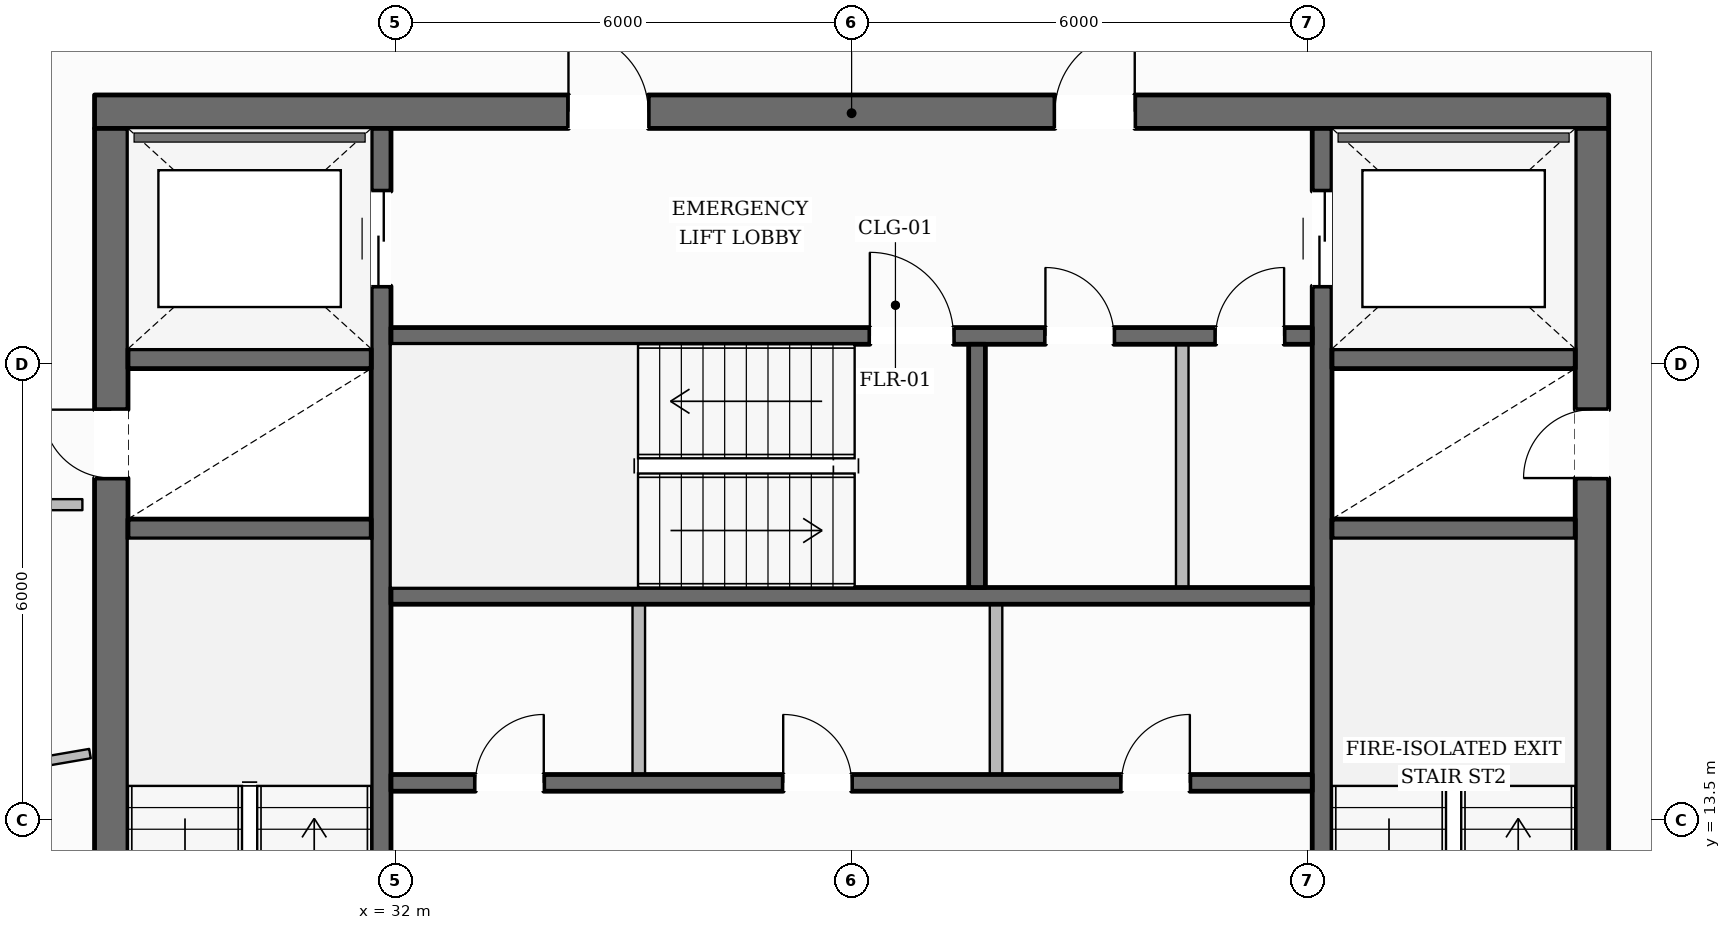
"""IFC4 building model, lengths in metres.
Left out: names, types, materials, properties, quantities, classifications, styles, units other than length and angle.
Written with IfcOpenShell. Run it as: python <this file> out.ifc"""

import sys

from ifc_helpers import new_model, si_unit, direction, frame, frame_2d, origin, place, context, subcontext, project, spatial, rectangle, extrude, element, fill, save


model = new_model("IFC4")
c1 = context("Model", 3, precision=1e-05, world=origin(), true_north=direction((0.0, 1.0)))
c2 = subcontext(c1, "Body", "Model", "MODEL_VIEW")
j1 = project(units=[si_unit("LENGTHUNIT", "METRE"), si_unit("PLANEANGLEUNIT", "RADIAN")], contexts=[c1])
p1 = place(None, origin())
s1 = spatial("IfcSite", under=j1, at=p1, CompositionType="ELEMENT")
p2 = place(p1, origin())
s2 = spatial("IfcBuilding", under=s1, at=p2, CompositionType="ELEMENT")
p3 = place(p2, frame((0.0, 0.0, 184.25)))
s3 = spatial("IfcBuildingStorey", under=s2, at=p3, CompositionType="ELEMENT", Elevation=184.25)
p4 = place(p3, frame((28.04, 22.82, 0.0), z_axis=(0.0, 0.0, 1.0), x_axis=(1.0, 0.0, 0.0)))
e1 = element("IfcWall", 1, at=p4, inside=s3, PredefinedType="SOLIDWALL", context=c2, shape_type="SweptSolid", body=[
    extrude(rectangle(XDim=19.92, YDim=0.44, at=frame_2d((9.96, 0.0))), origin(), (0.0, 0.0, 1.0), 3.6),
])
p5 = place(p4, frame((6.235, 0.0, 0.0)))
e2 = element("IfcOpeningElement", 2, at=p5, cuts=e1, PredefinedType="OPENING", context=c2, shape_type="SweptSolid", body=[
    extrude(rectangle(XDim=1.05, YDim=2.15, at=frame_2d((0.525, 1.075))), frame((0.0, 0.23, 0.0), z_axis=(0.0, -1.0, 0.0), x_axis=(1.0, 0.0, 0.0)), (0.0, 0.0, 1.0), 0.46),
])
p6 = place(p4, frame((12.635, 0.0, 0.0)))
e3 = element("IfcOpeningElement", 3, at=p6, cuts=e1, PredefinedType="OPENING", context=c2, shape_type="SweptSolid", body=[
    extrude(rectangle(XDim=1.05, YDim=2.15, at=frame_2d((0.525, 1.075))), frame((0.0, 0.23, 0.0), z_axis=(0.0, -1.0, 0.0), x_axis=(1.0, 0.0, 0.0)), (0.0, 0.0, 1.0), 0.46),
])
p7 = place(p3, frame((28.26, 9.6, 0.0), z_axis=(0.0, 0.0, 1.0), x_axis=(0.0, 1.0, 0.0)))
e4 = element("IfcWall", 4, at=p7, inside=s3, PredefinedType="SOLIDWALL", context=c2, shape_type="SweptSolid", body=[
    extrude(rectangle(XDim=13.0, YDim=0.44, at=frame_2d((6.5, 0.0))), origin(), (0.0, 0.0, 1.0), 3.6),
])
p8 = place(p7, frame((0.2, 0.0, 0.0)))
e5 = element("IfcOpeningElement", 5, at=p8, cuts=e4, PredefinedType="OPENING", context=c2, shape_type="SweptSolid", body=[
    extrude(rectangle(XDim=1.1, YDim=2.15, at=frame_2d((0.55, 1.075))), frame((0.0, 0.23, 0.0), z_axis=(0.0, -1.0, 0.0), x_axis=(1.0, 0.0, 0.0)), (0.0, 0.0, 1.0), 0.46),
])
p9 = place(p7, frame((8.4, 0.0, 0.0)))
e6 = element("IfcOpeningElement", 6, at=p9, cuts=e4, PredefinedType="OPENING", context=c2, shape_type="SweptSolid", body=[
    extrude(rectangle(XDim=0.9, YDim=2.1, at=frame_2d((0.45, 1.05))), frame((0.0, 0.23, 0.0), z_axis=(0.0, -1.0, 0.0), x_axis=(1.0, 0.0, 0.0)), (0.0, 0.0, 1.0), 0.46),
])
p10 = place(p3, frame((47.74, 9.6, 0.0), z_axis=(0.0, 0.0, 1.0), x_axis=(0.0, 1.0, 0.0)))
e7 = element("IfcWall", 7, at=p10, inside=s3, PredefinedType="SOLIDWALL", context=c2, shape_type="SweptSolid", body=[
    extrude(rectangle(XDim=13.0, YDim=0.44, at=frame_2d((6.5, 0.0))), origin(), (0.0, 0.0, 1.0), 3.6),
])
p11 = place(p10, frame((0.2, 0.0, 0.0)))
e8 = element("IfcOpeningElement", 8, at=p11, cuts=e7, PredefinedType="OPENING", context=c2, shape_type="SweptSolid", body=[
    extrude(rectangle(XDim=1.1, YDim=2.15, at=frame_2d((0.55, 1.075))), frame((0.0, 0.23, 0.0), z_axis=(0.0, -1.0, 0.0), x_axis=(1.0, 0.0, 0.0)), (0.0, 0.0, 1.0), 0.46),
])
p12 = place(p10, frame((8.4, 0.0, 0.0)))
e9 = element("IfcOpeningElement", 9, at=p12, cuts=e7, PredefinedType="OPENING", context=c2, shape_type="SweptSolid", body=[
    extrude(rectangle(XDim=0.9, YDim=2.1, at=frame_2d((0.45, 1.05))), frame((0.0, 0.23, 0.0), z_axis=(0.0, -1.0, 0.0), x_axis=(1.0, 0.0, 0.0)), (0.0, 0.0, 1.0), 0.46),
])
p13 = place(p3, frame((31.81, 9.6, 0.0), z_axis=(0.0, 0.0, 1.0), x_axis=(0.0, 1.0, 0.0)))
e10 = element("IfcWall", 10, at=p13, inside=s3, PredefinedType="SHEAR", context=c2, shape_type="SweptSolid", body=[
    extrude(rectangle(XDim=13.0, YDim=0.26, at=frame_2d((6.5, 0.0))), origin(), (0.0, 0.0, 1.0), 3.6),
])
p14 = place(p13, frame((10.925, 0.0, 0.0)))
e11 = element("IfcOpeningElement", 11, at=p14, cuts=e10, PredefinedType="OPENING", context=c2, shape_type="SweptSolid", body=[
    extrude(rectangle(XDim=1.25, YDim=2.25, at=frame_2d((0.625, 1.125))), frame((0.0, 0.14, 0.0), z_axis=(0.0, -1.0, 0.0), x_axis=(1.0, 0.0, 0.0)), (0.0, 0.0, 1.0), 0.28),
])
p15 = place(p3, frame((44.19, 9.6, 0.0), z_axis=(0.0, 0.0, 1.0), x_axis=(0.0, 1.0, 0.0)))
e12 = element("IfcWall", 12, at=p15, inside=s3, PredefinedType="SHEAR", context=c2, shape_type="SweptSolid", body=[
    extrude(rectangle(XDim=13.0, YDim=0.26, at=frame_2d((6.5, 0.0))), origin(), (0.0, 0.0, 1.0), 3.6),
])
p16 = place(p15, frame((10.925, 0.0, 0.0)))
e13 = element("IfcOpeningElement", 13, at=p16, cuts=e12, PredefinedType="OPENING", context=c2, shape_type="SweptSolid", body=[
    extrude(rectangle(XDim=1.25, YDim=2.25, at=frame_2d((0.625, 1.125))), frame((0.0, 0.14, 0.0), z_axis=(0.0, -1.0, 0.0), x_axis=(1.0, 0.0, 0.0)), (0.0, 0.0, 1.0), 0.28),
])
for number, where, z_axis, x_axis in (
    (14, (28.48, 17.33, 0.0), (0.0, 0.0, 1.0), (1.0, 0.0, 0.0)),
    (15, (28.48, 19.57, 0.0), (0.0, 0.0, 1.0), (1.0, 0.0, 0.0)),
    (16, (44.32, 17.33, 0.0), (0.0, 0.0, 1.0), (1.0, 0.0, 0.0)),
    (17, (44.32, 19.57, 0.0), (0.0, 0.0, 1.0), (1.0, 0.0, 0.0)),
):
    element("IfcWall", number, at=place(p3, frame(where, z_axis=z_axis, x_axis=x_axis)), inside=s3, PredefinedType="SHEAR", context=c2, shape_type="SweptSolid", body=[
        extrude(rectangle(XDim=3.2, YDim=0.26, at=frame_2d((1.6, 0.0))), origin(), (0.0, 0.0, 1.0), 3.6),
    ])
p17 = place(p3, frame((31.94, 19.87, 0.0), z_axis=(0.0, 0.0, 1.0), x_axis=(1.0, 0.0, 0.0)))
e18 = element("IfcWall", 18, at=p17, inside=s3, PredefinedType="SOLIDWALL", context=c2, shape_type="SweptSolid", body=[
    extrude(rectangle(XDim=12.12, YDim=0.22, at=frame_2d((6.06, 0.0))), origin(), (0.0, 0.0, 1.0), 3.6),
])
p18 = place(p17, frame((6.3, 0.0, 0.0)))
e19 = element("IfcOpeningElement", 19, at=p18, cuts=e18, PredefinedType="OPENING", context=c2, shape_type="SweptSolid", body=[
    extrude(rectangle(XDim=1.1, YDim=2.15, at=frame_2d((0.55, 1.075))), frame((0.0, 0.12, 0.0), z_axis=(0.0, -1.0, 0.0), x_axis=(1.0, 0.0, 0.0)), (0.0, 0.0, 1.0), 0.24),
])
p19 = place(p17, frame((8.61, 0.0, 0.0)))
e20 = element("IfcOpeningElement", 20, at=p19, cuts=e18, PredefinedType="OPENING", context=c2, shape_type="SweptSolid", body=[
    extrude(rectangle(XDim=0.9, YDim=2.1, at=frame_2d((0.45, 1.05))), frame((0.0, 0.12, 0.0), z_axis=(0.0, -1.0, 0.0), x_axis=(1.0, 0.0, 0.0)), (0.0, 0.0, 1.0), 0.24),
])
p20 = place(p17, frame((10.85, 0.0, 0.0)))
e21 = element("IfcOpeningElement", 21, at=p20, cuts=e18, PredefinedType="OPENING", context=c2, shape_type="SweptSolid", body=[
    extrude(rectangle(XDim=0.9, YDim=2.1, at=frame_2d((0.45, 1.05))), frame((0.0, 0.12, 0.0), z_axis=(0.0, -1.0, 0.0), x_axis=(1.0, 0.0, 0.0)), (0.0, 0.0, 1.0), 0.24),
])
p21 = place(p3, frame((31.94, 16.45, 0.0), z_axis=(0.0, 0.0, 1.0), x_axis=(1.0, 0.0, 0.0)))
e22 = element("IfcWall", 22, at=p21, inside=s3, PredefinedType="SOLIDWALL", context=c2, shape_type="SweptSolid", body=[
    extrude(rectangle(XDim=12.12, YDim=0.22, at=frame_2d((6.06, 0.0))), origin(), (0.0, 0.0, 1.0), 3.6),
])
p22 = place(p3, frame((39.65, 16.56, 0.0), z_axis=(0.0, 0.0, 1.0), x_axis=(0.0, 1.0, 0.0)))
e23 = element("IfcWall", 23, at=p22, inside=s3, PredefinedType="SOLIDWALL", context=c2, shape_type="SweptSolid", body=[
    extrude(rectangle(XDim=3.2, YDim=0.22, at=frame_2d((1.6, 0.0))), origin(), (0.0, 0.0, 1.0), 3.6),
])
p23 = place(p3, frame((31.94, 13.99, 0.0), z_axis=(0.0, 0.0, 1.0), x_axis=(1.0, 0.0, 0.0)))
e24 = element("IfcWall", 24, at=p23, inside=s3, PredefinedType="SOLIDWALL", context=c2, shape_type="SweptSolid", body=[
    extrude(rectangle(XDim=12.12, YDim=0.22, at=frame_2d((6.06, 0.0))), origin(), (0.0, 0.0, 1.0), 3.6),
])
p24 = place(p23, frame((1.11, 0.0, 0.0)))
e25 = element("IfcOpeningElement", 25, at=p24, cuts=e24, PredefinedType="OPENING", context=c2, shape_type="SweptSolid", body=[
    extrude(rectangle(XDim=0.9, YDim=2.1, at=frame_2d((0.45, 1.05))), frame((0.0, 0.12, 0.0), z_axis=(0.0, -1.0, 0.0), x_axis=(1.0, 0.0, 0.0)), (0.0, 0.0, 1.0), 0.24),
])
p25 = place(p23, frame((5.16, 0.0, 0.0)))
e26 = element("IfcOpeningElement", 26, at=p25, cuts=e24, PredefinedType="OPENING", context=c2, shape_type="SweptSolid", body=[
    extrude(rectangle(XDim=0.9, YDim=2.1, at=frame_2d((0.45, 1.05))), frame((0.0, 0.12, 0.0), z_axis=(0.0, -1.0, 0.0), x_axis=(1.0, 0.0, 0.0)), (0.0, 0.0, 1.0), 0.24),
])
p26 = place(p23, frame((9.61, 0.0, 0.0)))
e27 = element("IfcOpeningElement", 27, at=p26, cuts=e24, PredefinedType="OPENING", context=c2, shape_type="SweptSolid", body=[
    extrude(rectangle(XDim=0.9, YDim=2.1, at=frame_2d((0.45, 1.05))), frame((0.0, 0.12, 0.0), z_axis=(0.0, -1.0, 0.0), x_axis=(1.0, 0.0, 0.0)), (0.0, 0.0, 1.0), 0.24),
])
p27 = place(p3, frame((15.064, 11.953, 0.0), z_axis=(0.0, 0.0, 1.0), x_axis=(0.495993114815, 0.86832645362, 0.0)))
e28 = element("IfcWall", 28, at=p27, inside=s3, PredefinedType="STANDARD", context=c2, shape_type="SweptSolid", body=[
    extrude(rectangle(XDim=37.324, YDim=0.35, at=frame_2d((18.662, 0.0))), origin(), (0.0, 0.0, 1.0), 3.132),
])
p28 = place(p27, frame((33.087, 0.0, 0.65)))
e29 = element("IfcOpeningElement", 29, at=p28, cuts=e28, PredefinedType="OPENING", context=c2, shape_type="SweptSolid", body=[
    extrude(rectangle(XDim=1.45, YDim=1.75, at=frame_2d((0.725, 0.875))), frame((0.0, 0.185, 0.0), z_axis=(0.0, -1.0, 0.0), x_axis=(1.0, 0.0, 0.0)), (0.0, 0.0, 1.0), 0.37),
])
p29 = place(p27, frame((27.026, 0.0, 0.65)))
e30 = element("IfcOpeningElement", 30, at=p29, cuts=e28, PredefinedType="OPENING", context=c2, shape_type="SweptSolid", body=[
    extrude(rectangle(XDim=1.45, YDim=1.75, at=frame_2d((0.725, 0.875))), frame((0.0, 0.185, 0.0), z_axis=(0.0, -1.0, 0.0), x_axis=(1.0, 0.0, 0.0)), (0.0, 0.0, 1.0), 0.37),
])
p30 = place(p27, frame((14.904, 0.0, 0.65)))
e31 = element("IfcOpeningElement", 31, at=p30, cuts=e28, PredefinedType="OPENING", context=c2, shape_type="SweptSolid", body=[
    extrude(rectangle(XDim=1.45, YDim=1.75, at=frame_2d((0.725, 0.875))), frame((0.0, 0.185, 0.0), z_axis=(0.0, -1.0, 0.0), x_axis=(1.0, 0.0, 0.0)), (0.0, 0.0, 1.0), 0.37),
])
p31 = place(p27, frame((8.844, 0.0, 0.65)))
e32 = element("IfcOpeningElement", 32, at=p31, cuts=e28, PredefinedType="OPENING", context=c2, shape_type="SweptSolid", body=[
    extrude(rectangle(XDim=1.45, YDim=1.75, at=frame_2d((0.725, 0.875))), frame((0.0, 0.185, 0.0), z_axis=(0.0, -1.0, 0.0), x_axis=(1.0, 0.0, 0.0)), (0.0, 0.0, 1.0), 0.37),
])
p32 = place(p27, frame((2.782, 0.0, 0.65)))
e33 = element("IfcOpeningElement", 33, at=p32, cuts=e28, PredefinedType="OPENING", context=c2, shape_type="SweptSolid", body=[
    extrude(rectangle(XDim=1.45, YDim=1.75, at=frame_2d((0.725, 0.875))), frame((0.0, 0.185, 0.0), z_axis=(0.0, -1.0, 0.0), x_axis=(1.0, 0.0, 0.0)), (0.0, 0.0, 1.0), 0.37),
])
p33 = place(p3, frame((42.575, 44.272, 0.0), z_axis=(0.0, 0.0, 1.0), x_axis=(0.503934681705, -0.863741764982, 0.0)))
e34 = element("IfcWall", 34, at=p33, inside=s3, PredefinedType="STANDARD", context=c2, shape_type="SweptSolid", body=[
    extrude(rectangle(XDim=37.915, YDim=0.35, at=frame_2d((18.958, 0.0))), origin(), (0.0, 0.0, 1.0), 3.132),
])
p34 = place(p33, frame((33.633, 0.0, 0.65)))
e35 = element("IfcOpeningElement", 35, at=p34, cuts=e34, PredefinedType="OPENING", context=c2, shape_type="SweptSolid", body=[
    extrude(rectangle(XDim=1.45, YDim=1.75, at=frame_2d((0.725, 0.875))), frame((0.0, 0.185, 0.0), z_axis=(0.0, -1.0, 0.0), x_axis=(1.0, 0.0, 0.0)), (0.0, 0.0, 1.0), 0.37),
])
p35 = place(p33, frame((27.472, 0.0, 0.65)))
e36 = element("IfcOpeningElement", 36, at=p35, cuts=e34, PredefinedType="OPENING", context=c2, shape_type="SweptSolid", body=[
    extrude(rectangle(XDim=1.45, YDim=1.75, at=frame_2d((0.725, 0.875))), frame((0.0, 0.185, 0.0), z_axis=(0.0, -1.0, 0.0), x_axis=(1.0, 0.0, 0.0)), (0.0, 0.0, 1.0), 0.37),
])
p36 = place(p33, frame((15.15, 0.0, 0.65)))
e37 = element("IfcOpeningElement", 37, at=p36, cuts=e34, PredefinedType="OPENING", context=c2, shape_type="SweptSolid", body=[
    extrude(rectangle(XDim=1.45, YDim=1.75, at=frame_2d((0.725, 0.875))), frame((0.0, 0.185, 0.0), z_axis=(0.0, -1.0, 0.0), x_axis=(1.0, 0.0, 0.0)), (0.0, 0.0, 1.0), 0.37),
])
p37 = place(p33, frame((8.989, 0.0, 0.65)))
e38 = element("IfcOpeningElement", 38, at=p37, cuts=e34, PredefinedType="OPENING", context=c2, shape_type="SweptSolid", body=[
    extrude(rectangle(XDim=1.45, YDim=1.75, at=frame_2d((0.725, 0.875))), frame((0.0, 0.185, 0.0), z_axis=(0.0, -1.0, 0.0), x_axis=(1.0, 0.0, 0.0)), (0.0, 0.0, 1.0), 0.37),
])
p38 = place(p33, frame((2.828, 0.0, 0.65)))
e39 = element("IfcOpeningElement", 39, at=p38, cuts=e34, PredefinedType="OPENING", context=c2, shape_type="SweptSolid", body=[
    extrude(rectangle(XDim=1.45, YDim=1.75, at=frame_2d((0.725, 0.875))), frame((0.0, 0.185, 0.0), z_axis=(0.0, -1.0, 0.0), x_axis=(1.0, 0.0, 0.0)), (0.0, 0.0, 1.0), 0.37),
])
for number, where, z_axis, x_axis in (
    (40, (35.2, 14.1, 0.0), (0.0, 0.0, 1.0), (0.0, 1.0, 0.0)),
    (41, (39.9, 14.1, 0.0), (0.0, 0.0, 1.0), (0.0, 1.0, 0.0)),
):
    element("IfcWall", number, at=place(p3, frame(where, z_axis=z_axis, x_axis=x_axis)), inside=s3, PredefinedType="PARTITIONING", context=c2, shape_type="SweptSolid", body=[
        extrude(rectangle(XDim=2.24, YDim=0.165, at=frame_2d((1.12, 0.0))), origin(), (0.0, 0.0, 1.0), 3.6),
    ])
p39 = place(p3, frame((42.35, 16.56, 0.0), z_axis=(0.0, 0.0, 1.0), x_axis=(0.0, 1.0, 0.0)))
e42 = element("IfcWall", 42, at=p39, inside=s3, PredefinedType="PARTITIONING", context=c2, shape_type="SweptSolid", body=[
    extrude(rectangle(XDim=3.2, YDim=0.165, at=frame_2d((1.6, 0.0))), origin(), (0.0, 0.0, 1.0), 3.6),
])
p40 = place(p3, frame((27.88, 17.65, 0.0), z_axis=(0.0, 0.0, 1.0), x_axis=(-1.0, 0.0, 0.0)))
e43 = element("IfcWall", 43, at=p40, inside=s3, PredefinedType="PARTITIONING", context=c2, shape_type="SweptSolid", body=[
    extrude(rectangle(XDim=1.82, YDim=0.145, at=frame_2d((0.91, 0.0))), origin(), (0.0, 0.0, 1.0), 3.141),
])
p41 = place(p3, frame((27.98, 14.375, 0.0), z_axis=(0.0, 0.0, 1.0), x_axis=(-0.9855033492, -0.169655971646, 0.0)))
e44 = element("IfcWall", 44, at=p41, inside=s3, PredefinedType="PARTITIONING", context=c2, shape_type="SweptSolid", body=[
    extrude(rectangle(XDim=12.315, YDim=0.125, at=frame_2d((6.158, 0.0))), origin(), (0.0, 0.0, 1.0), 3.141),
])
p42 = place(p18, origin())
e45 = element("IfcDoor", 45, at=p42, inside=s3, OperationType="SINGLE_SWING_LEFT", PredefinedType="DOOR", context=c2, shape_type="SweptSolid", body=[
    extrude(rectangle(XDim=1.1, YDim=2.15, at=frame_2d((0.55, 1.075))), frame((0.0, 0.025, 0.0), z_axis=(0.0, -1.0, 0.0), x_axis=(1.0, 0.0, 0.0)), (0.0, 0.0, 1.0), 0.05),
])
fill(e19, e45)
p43 = place(p9, origin())
e46 = element("IfcDoor", 46, at=p43, inside=s3, OperationType="SINGLE_SWING_RIGHT", PredefinedType="DOOR", context=c2, shape_type="SweptSolid", body=[
    extrude(rectangle(XDim=0.9, YDim=2.1, at=frame_2d((0.45, 1.05))), frame((0.0, 0.025, 0.0), z_axis=(0.0, -1.0, 0.0), x_axis=(1.0, 0.0, 0.0)), (0.0, 0.0, 1.0), 0.05),
])
fill(e6, e46)
p44 = place(p12, origin())
e47 = element("IfcDoor", 47, at=p44, inside=s3, OperationType="SINGLE_SWING_LEFT", PredefinedType="DOOR", context=c2, shape_type="SweptSolid", body=[
    extrude(rectangle(XDim=0.9, YDim=2.1, at=frame_2d((0.45, 1.05))), frame((0.0, 0.025, 0.0), z_axis=(0.0, -1.0, 0.0), x_axis=(1.0, 0.0, 0.0)), (0.0, 0.0, 1.0), 0.05),
])
fill(e9, e47)
p45 = place(p5, origin())
e48 = element("IfcDoor", 48, at=p45, inside=s3, OperationType="SINGLE_SWING_LEFT", PredefinedType="DOOR", context=c2, shape_type="SweptSolid", body=[
    extrude(rectangle(XDim=1.05, YDim=2.15, at=frame_2d((0.525, 1.075))), frame((0.0, 0.025, 0.0), z_axis=(0.0, -1.0, 0.0), x_axis=(1.0, 0.0, 0.0)), (0.0, 0.0, 1.0), 0.05),
])
fill(e2, e48)
p46 = place(p6, origin())
e49 = element("IfcDoor", 49, at=p46, inside=s3, OperationType="SINGLE_SWING_RIGHT", PredefinedType="DOOR", context=c2, shape_type="SweptSolid", body=[
    extrude(rectangle(XDim=1.05, YDim=2.15, at=frame_2d((0.525, 1.075))), frame((0.0, 0.025, 0.0), z_axis=(0.0, -1.0, 0.0), x_axis=(1.0, 0.0, 0.0)), (0.0, 0.0, 1.0), 0.05),
])
fill(e3, e49)
p47 = place(p14, origin())
e50 = element("IfcDoor", 50, at=p47, inside=s3, OperationType="DOUBLE_DOOR_SLIDING", PredefinedType="DOOR", context=c2, shape_type="SweptSolid", body=[
    extrude(rectangle(XDim=1.25, YDim=2.25, at=frame_2d((0.625, 1.125))), frame((0.0, 0.025, 0.0), z_axis=(0.0, -1.0, 0.0), x_axis=(1.0, 0.0, 0.0)), (0.0, 0.0, 1.0), 0.05),
])
fill(e11, e50)
p48 = place(p16, origin())
e51 = element("IfcDoor", 51, at=p48, inside=s3, OperationType="DOUBLE_DOOR_SLIDING", PredefinedType="DOOR", context=c2, shape_type="SweptSolid", body=[
    extrude(rectangle(XDim=1.25, YDim=2.25, at=frame_2d((0.625, 1.125))), frame((0.0, 0.025, 0.0), z_axis=(0.0, -1.0, 0.0), x_axis=(1.0, 0.0, 0.0)), (0.0, 0.0, 1.0), 0.05),
])
fill(e13, e51)
p49 = place(p24, origin())
e52 = element("IfcDoor", 52, at=p49, inside=s3, OperationType="SINGLE_SWING_RIGHT", PredefinedType="DOOR", context=c2, shape_type="SweptSolid", body=[
    extrude(rectangle(XDim=0.9, YDim=2.1, at=frame_2d((0.45, 1.05))), frame((0.0, 0.025, 0.0), z_axis=(0.0, -1.0, 0.0), x_axis=(1.0, 0.0, 0.0)), (0.0, 0.0, 1.0), 0.05),
])
fill(e25, e52)
p50 = place(p25, origin())
e53 = element("IfcDoor", 53, at=p50, inside=s3, OperationType="SINGLE_SWING_LEFT", PredefinedType="DOOR", context=c2, shape_type="SweptSolid", body=[
    extrude(rectangle(XDim=0.9, YDim=2.1, at=frame_2d((0.45, 1.05))), frame((0.0, 0.025, 0.0), z_axis=(0.0, -1.0, 0.0), x_axis=(1.0, 0.0, 0.0)), (0.0, 0.0, 1.0), 0.05),
])
fill(e26, e53)
p51 = place(p26, origin())
e54 = element("IfcDoor", 54, at=p51, inside=s3, OperationType="SINGLE_SWING_RIGHT", PredefinedType="DOOR", context=c2, shape_type="SweptSolid", body=[
    extrude(rectangle(XDim=0.9, YDim=2.1, at=frame_2d((0.45, 1.05))), frame((0.0, 0.025, 0.0), z_axis=(0.0, -1.0, 0.0), x_axis=(1.0, 0.0, 0.0)), (0.0, 0.0, 1.0), 0.05),
])
fill(e27, e54)
p52 = place(p19, origin())
e55 = element("IfcDoor", 55, at=p52, inside=s3, OperationType="SINGLE_SWING_LEFT", PredefinedType="DOOR", context=c2, shape_type="SweptSolid", body=[
    extrude(rectangle(XDim=0.9, YDim=2.1, at=frame_2d((0.45, 1.05))), frame((0.0, 0.025, 0.0), z_axis=(0.0, -1.0, 0.0), x_axis=(1.0, 0.0, 0.0)), (0.0, 0.0, 1.0), 0.05),
])
fill(e20, e55)
p53 = place(p20, origin())
e56 = element("IfcDoor", 56, at=p53, inside=s3, OperationType="SINGLE_SWING_RIGHT", PredefinedType="DOOR", context=c2, shape_type="SweptSolid", body=[
    extrude(rectangle(XDim=0.9, YDim=2.1, at=frame_2d((0.45, 1.05))), frame((0.0, 0.025, 0.0), z_axis=(0.0, -1.0, 0.0), x_axis=(1.0, 0.0, 0.0)), (0.0, 0.0, 1.0), 0.05),
])
fill(e21, e56)
save(model, sys.argv[1])
